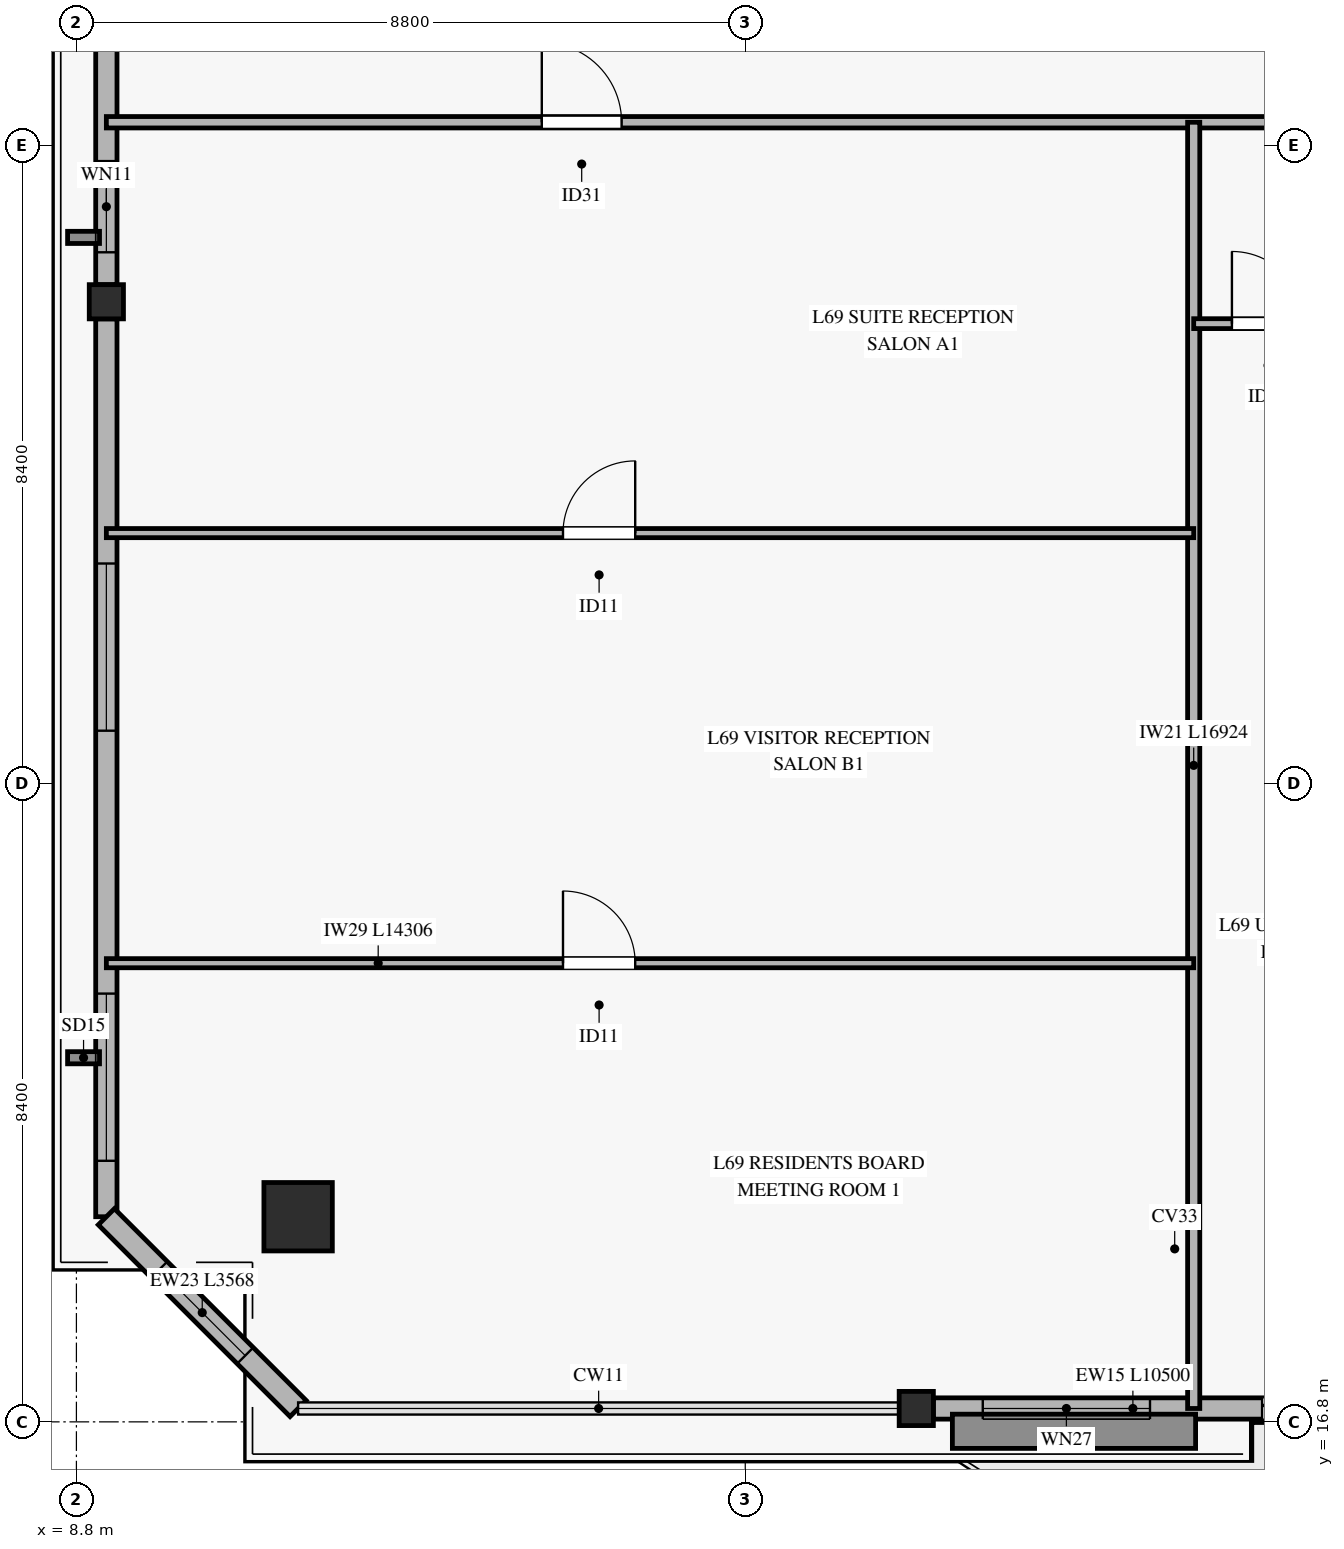
"""IFC4 building model, lengths in metres.
Left out: names, types, materials, properties, quantities, classifications, styles, units other than length and angle.
Written with IfcOpenShell. Run it as: python <this file> out.ifc"""

import sys

from ifc_helpers import new_model, si_unit, direction, frame, frame_2d, origin, origin_2d, place, context, subcontext, project, spatial, rectangle, hollow_rectangle, extrude, source, transform, mapped, element, fill, save


model = new_model("IFC4")
c1 = context("Model", 3, precision=1e-05, world=origin(), true_north=direction((0.0, 1.0)))
c2 = subcontext(c1, "Body", "Model", "MODEL_VIEW")
j1 = project(units=[si_unit("LENGTHUNIT", "METRE"), si_unit("PLANEANGLEUNIT", "RADIAN")], contexts=[c1])
p1 = place(None, origin())
s1 = spatial("IfcSite", under=j1, at=p1, CompositionType="ELEMENT")
p2 = place(p1, origin())
s2 = spatial("IfcBuilding", under=s1, at=p2, CompositionType="ELEMENT")
p3 = place(p2, frame((0.0, 0.0, 268.9)))
s3 = spatial("IfcBuildingStorey", under=s2, at=p3, CompositionType="ELEMENT", Elevation=268.9)
m1 = source(origin(), c2, "Body", "SweptSolid", [
    extrude(hollow_rectangle(XDim=0.9, YDim=0.9, WallThickness=0.04, at=origin_2d()), origin(), (0.0, 0.0, 1.0), 3.185),
])
p4 = place(p3, frame((11.717, 19.499, 0.0), z_axis=(0.0, 0.0, 1.0), x_axis=(1.0, 0.0, 0.0)))
e1 = element("IfcColumn", 1, at=p4, inside=s3, PredefinedType="COLUMN", context=c2, shape_type="MappedRepresentation", body=[
    mapped(m1, transform((0.0, 0.0, 0.0), x_axis=(1.0, 0.0, 0.0), y_axis=(0.0, 1.0, 0.0), z_axis=(0.0, 0.0, 1.0), scale=1.0)),
])
m2 = source(origin(), c2, "Body", "SweptSolid", [
    extrude(hollow_rectangle(XDim=0.45, YDim=0.45, WallThickness=0.022, at=origin_2d()), origin(), (0.0, 0.0, 1.0), 3.185),
])
for number, where, z_axis, x_axis in (
    (2, (19.85, 16.976, 0.0), (0.0, 0.0, 1.0), (1.0, 0.0, 0.0)),
    (3, (9.194, 31.538, 0.0), (0.0, 0.0, 1.0), (1.0, 0.0, 0.0)),
):
    element("IfcColumn", number, at=place(p3, frame(where, z_axis=z_axis, x_axis=x_axis)), inside=s3, PredefinedType="COLUMN", context=c2, shape_type="MappedRepresentation", body=[
        mapped(m2, transform((0.0, 0.0, 0.0), x_axis=(1.0, 0.0, 0.0), y_axis=(0.0, 1.0, 0.0), z_axis=(0.0, 0.0, 1.0), scale=1.0)),
    ])
p5 = place(p3, frame((20.075, 16.976, 0.0), z_axis=(0.0, 0.0, 1.0), x_axis=(1.0, 0.0, 0.0)))
e4 = element("IfcWall", 4, at=p5, inside=s3, PredefinedType="SOLIDWALL", context=c2, shape_type="SweptSolid", body=[
    extrude(rectangle(XDim=10.5, YDim=0.28, at=frame_2d((5.25, 0.0))), origin(), (0.0, 0.0, 1.0), 2.815),
])
p6 = place(p5, frame((4.325, 0.0, 0.0)))
e5 = element("IfcOpeningElement", 5, at=p6, cuts=e4, PredefinedType="OPENING", context=c2, shape_type="SweptSolid", body=[
    extrude(rectangle(XDim=1.8, YDim=2.25, at=frame_2d((0.9, 1.125))), frame((0.0, 0.15, 0.0), z_axis=(0.0, -1.0, 0.0), x_axis=(1.0, 0.0, 0.0)), (0.0, 0.0, 1.0), 0.3),
])
p7 = place(p5, frame((0.65, 0.0, 0.45)))
e6 = element("IfcOpeningElement", 6, at=p7, cuts=e4, PredefinedType="OPENING", context=c2, shape_type="SweptSolid", body=[
    extrude(rectangle(XDim=2.2, YDim=2.1, at=frame_2d((1.1, 1.05))), frame((0.0, 0.15, 0.0), z_axis=(0.0, -1.0, 0.0), x_axis=(1.0, 0.0, 0.0)), (0.0, 0.0, 1.0), 0.3),
])
p8 = place(p5, frame((7.35, 0.0, 0.45)))
e7 = element("IfcOpeningElement", 7, at=p8, cuts=e4, PredefinedType="OPENING", context=c2, shape_type="SweptSolid", body=[
    extrude(rectangle(XDim=1.6, YDim=2.0, at=frame_2d((0.8, 1.0))), frame((0.0, 0.15, 0.0), z_axis=(0.0, -1.0, 0.0), x_axis=(1.0, 0.0, 0.0)), (0.0, 0.0, 1.0), 0.3),
])
p9 = place(p3, frame((9.194, 19.499, 0.0), z_axis=(0.0, 0.0, 1.0), x_axis=(0.0, 1.0, 0.0)))
e8 = element("IfcWall", 8, at=p9, inside=s3, PredefinedType="SOLIDWALL", context=c2, shape_type="SweptSolid", body=[
    extrude(rectangle(XDim=11.814, YDim=0.28, at=frame_2d((5.907, 0.0))), origin(), (0.0, 0.0, 1.0), 2.815),
])
p10 = place(p9, frame((0.736, 0.0, 0.45)))
e9 = element("IfcOpeningElement", 9, at=p10, cuts=e8, PredefinedType="OPENING", context=c2, shape_type="SweptSolid", body=[
    extrude(rectangle(XDim=2.2, YDim=2.1, at=frame_2d((1.1, 1.05))), frame((0.0, 0.15, 0.0), z_axis=(0.0, -1.0, 0.0), x_axis=(1.0, 0.0, 0.0)), (0.0, 0.0, 1.0), 0.3),
])
p11 = place(p9, frame((6.395, 0.0, 0.45)))
e10 = element("IfcOpeningElement", 10, at=p11, cuts=e8, PredefinedType="OPENING", context=c2, shape_type="SweptSolid", body=[
    extrude(rectangle(XDim=2.2, YDim=2.1, at=frame_2d((1.1, 1.05))), frame((0.0, 0.15, 0.0), z_axis=(0.0, -1.0, 0.0), x_axis=(1.0, 0.0, 0.0)), (0.0, 0.0, 1.0), 0.3),
])
p12 = place(p3, frame((9.194, 31.763, 0.0), z_axis=(0.0, 0.0, 1.0), x_axis=(0.0, 1.0, 0.0)))
e11 = element("IfcWall", 11, at=p12, inside=s3, PredefinedType="SOLIDWALL", context=c2, shape_type="SweptSolid", body=[
    extrude(rectangle(XDim=11.814, YDim=0.28, at=frame_2d((5.907, 0.0))), origin(), (0.0, 0.0, 1.0), 2.815),
])
p13 = place(p12, frame((0.426, 0.0, 0.45)))
e12 = element("IfcOpeningElement", 12, at=p13, cuts=e11, PredefinedType="OPENING", context=c2, shape_type="SweptSolid", body=[
    extrude(rectangle(XDim=1.2, YDim=2.0, at=frame_2d((0.6, 1.0))), frame((0.0, 0.15, 0.0), z_axis=(0.0, -1.0, 0.0), x_axis=(1.0, 0.0, 0.0)), (0.0, 0.0, 1.0), 0.3),
])
p14 = place(p3, frame((9.194, 19.499, 0.0), z_axis=(0.0, 0.0, 1.0), x_axis=(0.707106781187, -0.707106781187, 0.0)))
e13 = element("IfcWall", 13, at=p14, inside=s3, PredefinedType="SOLIDWALL", context=c2, shape_type="SweptSolid", body=[
    extrude(rectangle(XDim=3.568, YDim=0.3, at=frame_2d((1.784, 0.0))), origin(), (0.0, 0.0, 1.0), 2.815),
])
p15 = place(p14, frame((0.984, 0.0, 0.45)))
e14 = element("IfcOpeningElement", 14, at=p15, cuts=e13, PredefinedType="OPENING", context=c2, shape_type="SweptSolid", body=[
    extrude(rectangle(XDim=1.6, YDim=2.0, at=frame_2d((0.8, 1.0))), frame((0.0, 0.16, 0.0), z_axis=(0.0, -1.0, 0.0), x_axis=(1.0, 0.0, 0.0)), (0.0, 0.0, 1.0), 0.32),
])
p16 = place(p3, frame((9.194, 33.9, 0.0), z_axis=(0.0, 0.0, 1.0), x_axis=(1.0, 0.0, 0.0)))
e15 = element("IfcWall", 15, at=p16, inside=s3, PredefinedType="PARTITIONING", context=c2, shape_type="SweptSolid", body=[
    extrude(rectangle(XDim=52.013, YDim=0.15, at=frame_2d((26.006, 0.0))), origin(), (0.0, 0.0, 1.0), 2.47),
])
p17 = place(p16, frame((5.729, 0.0, 0.0)))
e16 = element("IfcOpeningElement", 16, at=p17, cuts=e15, PredefinedType="OPENING", context=c2, shape_type="SweptSolid", body=[
    extrude(rectangle(XDim=1.05, YDim=2.15, at=frame_2d((0.525, 1.075))), frame((0.0, 0.085, 0.0), z_axis=(0.0, -1.0, 0.0), x_axis=(1.0, 0.0, 0.0)), (0.0, 0.0, 1.0), 0.17),
])
p18 = place(p16, frame((17.231, 0.0, 0.0)))
e17 = element("IfcOpeningElement", 17, at=p18, cuts=e15, PredefinedType="OPENING", context=c2, shape_type="SweptSolid", body=[
    extrude(rectangle(XDim=1.05, YDim=2.15, at=frame_2d((0.525, 1.075))), frame((0.0, 0.085, 0.0), z_axis=(0.0, -1.0, 0.0), x_axis=(1.0, 0.0, 0.0)), (0.0, 0.0, 1.0), 0.17),
])
p19 = place(p16, frame((23.759, 0.0, 0.0)))
e18 = element("IfcOpeningElement", 18, at=p19, cuts=e15, PredefinedType="OPENING", context=c2, shape_type="SweptSolid", body=[
    extrude(rectangle(XDim=1.05, YDim=2.15, at=frame_2d((0.525, 1.075))), frame((0.0, 0.085, 0.0), z_axis=(0.0, -1.0, 0.0), x_axis=(1.0, 0.0, 0.0)), (0.0, 0.0, 1.0), 0.17),
])
p20 = place(p16, frame((30.681, 0.0, 0.0)))
e19 = element("IfcOpeningElement", 19, at=p20, cuts=e15, PredefinedType="OPENING", context=c2, shape_type="SweptSolid", body=[
    extrude(rectangle(XDim=1.05, YDim=2.15, at=frame_2d((0.525, 1.075))), frame((0.0, 0.085, 0.0), z_axis=(0.0, -1.0, 0.0), x_axis=(1.0, 0.0, 0.0)), (0.0, 0.0, 1.0), 0.17),
])
p21 = place(p16, frame((36.826, 0.0, 0.0)))
e20 = element("IfcOpeningElement", 20, at=p21, cuts=e15, PredefinedType="OPENING", context=c2, shape_type="SweptSolid", body=[
    extrude(rectangle(XDim=1.05, YDim=2.15, at=frame_2d((0.525, 1.075))), frame((0.0, 0.085, 0.0), z_axis=(0.0, -1.0, 0.0), x_axis=(1.0, 0.0, 0.0)), (0.0, 0.0, 1.0), 0.17),
])
p22 = place(p16, frame((44.786, 0.0, 0.0)))
e21 = element("IfcOpeningElement", 21, at=p22, cuts=e15, PredefinedType="OPENING", context=c2, shape_type="SweptSolid", body=[
    extrude(rectangle(XDim=1.05, YDim=2.15, at=frame_2d((0.525, 1.075))), frame((0.0, 0.085, 0.0), z_axis=(0.0, -1.0, 0.0), x_axis=(1.0, 0.0, 0.0)), (0.0, 0.0, 1.0), 0.17),
])
p23 = place(p3, frame((23.5, 16.976, 0.0), z_axis=(0.0, 0.0, 1.0), x_axis=(0.0, 1.0, 0.0)))
e22 = element("IfcWall", 22, at=p23, inside=s3, PredefinedType="PARTITIONING", context=c2, shape_type="SweptSolid", body=[
    extrude(rectangle(XDim=16.924, YDim=0.16, at=frame_2d((8.462, 0.0))), origin(), (0.0, 0.0, 1.0), 2.77),
])
p24 = place(p3, frame((9.194, 22.835, 0.0), z_axis=(0.0, 0.0, 1.0), x_axis=(1.0, 0.0, 0.0)))
e23 = element("IfcWall", 23, at=p24, inside=s3, PredefinedType="PARTITIONING", context=c2, shape_type="SweptSolid", body=[
    extrude(rectangle(XDim=14.306, YDim=0.12, at=frame_2d((7.153, 0.0))), origin(), (0.0, 0.0, 1.0), 2.47),
])
p25 = place(p24, frame((6.008, 0.0, 0.0)))
e24 = element("IfcOpeningElement", 24, at=p25, cuts=e23, PredefinedType="OPENING", context=c2, shape_type="SweptSolid", body=[
    extrude(rectangle(XDim=0.95, YDim=2.1, at=frame_2d((0.475, 1.05))), frame((0.0, 0.07, 0.0), z_axis=(0.0, -1.0, 0.0), x_axis=(1.0, 0.0, 0.0)), (0.0, 0.0, 1.0), 0.14),
])
p26 = place(p3, frame((9.194, 28.494, 0.0), z_axis=(0.0, 0.0, 1.0), x_axis=(1.0, 0.0, 0.0)))
e25 = element("IfcWall", 25, at=p26, inside=s3, PredefinedType="PARTITIONING", context=c2, shape_type="SweptSolid", body=[
    extrude(rectangle(XDim=14.306, YDim=0.12, at=frame_2d((7.153, 0.0))), origin(), (0.0, 0.0, 1.0), 2.47),
])
p27 = place(p26, frame((6.008, 0.0, 0.0)))
e26 = element("IfcOpeningElement", 26, at=p27, cuts=e25, PredefinedType="OPENING", context=c2, shape_type="SweptSolid", body=[
    extrude(rectangle(XDim=0.95, YDim=2.1, at=frame_2d((0.475, 1.05))), frame((0.0, 0.07, 0.0), z_axis=(0.0, -1.0, 0.0), x_axis=(1.0, 0.0, 0.0)), (0.0, 0.0, 1.0), 0.14),
])
p28 = place(p3, frame((23.5, 31.25, 0.0), z_axis=(0.0, 0.0, 1.0), x_axis=(1.0, 0.0, 0.0)))
e27 = element("IfcWall", 27, at=p28, inside=s3, PredefinedType="PARTITIONING", context=c2, shape_type="SweptSolid", body=[
    extrude(rectangle(XDim=1.715, YDim=0.13, at=frame_2d((0.857, 0.0))), origin(), (0.0, 0.0, 1.0), 3.185),
])
p29 = place(p28, frame((0.503, 0.0, 0.0)))
e28 = element("IfcOpeningElement", 28, at=p29, cuts=e27, PredefinedType="OPENING", context=c2, shape_type="SweptSolid", body=[
    extrude(rectangle(XDim=0.95, YDim=2.1, at=frame_2d((0.475, 1.05))), frame((0.0, 0.075, 0.0), z_axis=(0.0, -1.0, 0.0), x_axis=(1.0, 0.0, 0.0)), (0.0, 0.0, 1.0), 0.15),
])
m3 = source(origin(), c2, "Body", "SweptSolid", [
    extrude(rectangle(XDim=1.8, YDim=2.25, at=frame_2d((0.9, 1.125))), frame((0.0, 0.025, 0.0), z_axis=(0.0, -1.0, 0.0), x_axis=(1.0, 0.0, 0.0)), (0.0, 0.0, 1.0), 0.05),
])
p30 = place(p6, origin())
e29 = element("IfcDoor", 29, at=p30, inside=s3, OperationType="SLIDING_TO_LEFT", PredefinedType="DOOR", context=c2, shape_type="MappedRepresentation", body=[
    mapped(m3, transform((0.0, 0.0, 0.0), x_axis=(1.0, 0.0, 0.0), y_axis=(0.0, 1.0, 0.0), z_axis=(0.0, 0.0, 1.0), scale=1.0)),
])
fill(e5, e29)
m4 = source(origin(), c2, "Body", "SweptSolid", [
    extrude(rectangle(XDim=2.2, YDim=2.1, at=frame_2d((1.1, 1.05))), frame((0.0, 0.03, 0.0), z_axis=(0.0, -1.0, 0.0), x_axis=(1.0, 0.0, 0.0)), (0.0, 0.0, 1.0), 0.06),
])
p31 = place(p7, origin())
e30 = element("IfcWindow", 30, at=p31, inside=s3, PartitioningType="SINGLE_PANEL", PredefinedType="WINDOW", context=c2, shape_type="MappedRepresentation", body=[
    mapped(m4, transform((0.0, 0.0, 0.0), x_axis=(1.0, 0.0, 0.0), y_axis=(0.0, 1.0, 0.0), z_axis=(0.0, 0.0, 1.0), scale=1.0)),
])
fill(e6, e30)
p32 = place(p10, origin())
e31 = element("IfcWindow", 31, at=p32, inside=s3, PartitioningType="SINGLE_PANEL", PredefinedType="WINDOW", context=c2, shape_type="MappedRepresentation", body=[
    mapped(m4, transform((0.0, 0.0, 0.0), x_axis=(1.0, 0.0, 0.0), y_axis=(0.0, 1.0, 0.0), z_axis=(0.0, 0.0, 1.0), scale=1.0)),
])
fill(e9, e31)
p33 = place(p11, origin())
e32 = element("IfcWindow", 32, at=p33, inside=s3, PartitioningType="SINGLE_PANEL", PredefinedType="WINDOW", context=c2, shape_type="MappedRepresentation", body=[
    mapped(m4, transform((0.0, 0.0, 0.0), x_axis=(1.0, 0.0, 0.0), y_axis=(0.0, 1.0, 0.0), z_axis=(0.0, 0.0, 1.0), scale=1.0)),
])
fill(e10, e32)
m5 = source(origin(), c2, "Body", "SweptSolid", [
    extrude(rectangle(XDim=1.2, YDim=2.0, at=frame_2d((0.6, 1.0))), frame((0.0, 0.03, 0.0), z_axis=(0.0, -1.0, 0.0), x_axis=(1.0, 0.0, 0.0)), (0.0, 0.0, 1.0), 0.06),
])
p34 = place(p13, origin())
e33 = element("IfcWindow", 33, at=p34, inside=s3, PartitioningType="SINGLE_PANEL", PredefinedType="WINDOW", context=c2, shape_type="MappedRepresentation", body=[
    mapped(m5, transform((0.0, 0.0, 0.0), x_axis=(1.0, 0.0, 0.0), y_axis=(0.0, 1.0, 0.0), z_axis=(0.0, 0.0, 1.0), scale=1.0)),
])
fill(e12, e33)
m6 = source(origin(), c2, "Body", "SweptSolid", [
    extrude(rectangle(XDim=1.6, YDim=2.0, at=frame_2d((0.8, 1.0))), frame((0.0, 0.03, 0.0), z_axis=(0.0, -1.0, 0.0), x_axis=(1.0, 0.0, 0.0)), (0.0, 0.0, 1.0), 0.06),
])
p35 = place(p15, origin())
e34 = element("IfcWindow", 34, at=p35, inside=s3, PartitioningType="SINGLE_PANEL", PredefinedType="WINDOW", context=c2, shape_type="MappedRepresentation", body=[
    mapped(m6, transform((0.0, 0.0, 0.0), x_axis=(1.0, 0.0, 0.0), y_axis=(0.0, 1.0, 0.0), z_axis=(0.0, 0.0, 1.0), scale=1.0)),
])
fill(e14, e34)
m7 = source(origin(), c2, "Body", "SweptSolid", [
    extrude(rectangle(XDim=1.05, YDim=2.15, at=frame_2d((0.525, 1.075))), frame((0.0, 0.025, 0.0), z_axis=(0.0, -1.0, 0.0), x_axis=(1.0, 0.0, 0.0)), (0.0, 0.0, 1.0), 0.05),
])
p36 = place(p17, origin())
e35 = element("IfcDoor", 35, at=p36, inside=s3, OperationType="SINGLE_SWING_LEFT", PredefinedType="DOOR", context=c2, shape_type="MappedRepresentation", body=[
    mapped(m7, transform((0.0, 0.0, 0.0), x_axis=(1.0, 0.0, 0.0), y_axis=(0.0, 1.0, 0.0), z_axis=(0.0, 0.0, 1.0), scale=1.0)),
])
fill(e16, e35)
m8 = source(origin(), c2, "Body", "SweptSolid", [
    extrude(rectangle(XDim=0.95, YDim=2.1, at=frame_2d((0.475, 1.05))), frame((0.0, 0.025, 0.0), z_axis=(0.0, -1.0, 0.0), x_axis=(1.0, 0.0, 0.0)), (0.0, 0.0, 1.0), 0.05),
])
p37 = place(p27, origin())
e36 = element("IfcDoor", 36, at=p37, inside=s3, OperationType="SINGLE_SWING_RIGHT", PredefinedType="DOOR", context=c2, shape_type="MappedRepresentation", body=[
    mapped(m8, transform((0.0, 0.0, 0.0), x_axis=(1.0, 0.0, 0.0), y_axis=(0.0, 1.0, 0.0), z_axis=(0.0, 0.0, 1.0), scale=1.0)),
])
fill(e26, e36)
p38 = place(p25, origin())
e37 = element("IfcDoor", 37, at=p38, inside=s3, OperationType="SINGLE_SWING_LEFT", PredefinedType="DOOR", context=c2, shape_type="MappedRepresentation", body=[
    mapped(m8, transform((0.0, 0.0, 0.0), x_axis=(1.0, 0.0, 0.0), y_axis=(0.0, 1.0, 0.0), z_axis=(0.0, 0.0, 1.0), scale=1.0)),
])
fill(e24, e37)
p39 = place(p29, origin())
e38 = element("IfcDoor", 38, at=p39, inside=s3, OperationType="SINGLE_SWING_LEFT", PredefinedType="DOOR", context=c2, shape_type="MappedRepresentation", body=[
    mapped(m8, transform((0.0, 0.0, 0.0), x_axis=(1.0, 0.0, 0.0), y_axis=(0.0, 1.0, 0.0), z_axis=(0.0, 0.0, 1.0), scale=1.0)),
])
fill(e28, e38)
save(model, sys.argv[1])
